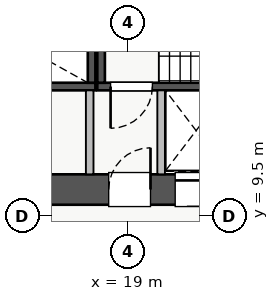
"""IFC4 building model, lengths in metres.
Left out: names, types, materials, properties, quantities, classifications, styles, units other than length and angle.
Written with IfcOpenShell. Run it as: python <this file> out.ifc"""

import sys

from ifc_helpers import new_model, si_unit, direction, frame, frame_2d, origin, place, context, subcontext, project, spatial, rectangle, extrude, source, transform, mapped, element, fill, save


model = new_model("IFC4")
c1 = context("Model", 3, precision=1e-05, world=origin(), true_north=direction((0.0, 1.0)))
c2 = subcontext(c1, "Body", "Model", "MODEL_VIEW")
j1 = project(units=[si_unit("LENGTHUNIT", "METRE"), si_unit("PLANEANGLEUNIT", "RADIAN")], contexts=[c1])
p1 = place(None, origin())
s1 = spatial("IfcSite", under=j1, at=p1, CompositionType="ELEMENT")
p2 = place(p1, origin())
s2 = spatial("IfcBuilding", under=s1, at=p2, CompositionType="ELEMENT")
p3 = place(p2, frame((0.0, 0.0, 36.0)))
s3 = spatial("IfcBuildingStorey", under=s2, at=p3, CompositionType="ELEMENT", Elevation=36.0)
p4 = place(p3, frame((19.88, 12.8, 0.0), z_axis=(0.0, 0.0, 1.0), x_axis=(1.0, 0.0, 0.0)))
e1 = element("IfcWall", 1, at=p4, inside=s3, PredefinedType="SHEAR", context=c2, shape_type="SweptSolid", body=[
    extrude(rectangle(XDim=1.87, YDim=0.18, at=frame_2d((0.935, 0.0))), origin(), (0.0, 0.0, 1.0), 3.07),
])
p5 = place(p3, frame((11.0, 12.91, 0.0), z_axis=(0.0, 0.0, 1.0), x_axis=(1.0, 0.0, 0.0)))
e2 = element("IfcWall", 2, at=p5, inside=s3, PredefinedType="SHEAR", context=c2, shape_type="SweptSolid", body=[
    extrude(rectangle(XDim=7.15, YDim=0.2, at=frame_2d((3.575, 0.0))), origin(), (0.0, 0.0, 1.0), 3.25),
])
p6 = place(p5, frame((0.35, 0.0, 0.0)))
e3 = element("IfcOpeningElement", 3, at=p6, cuts=e2, PredefinedType="OPENING", context=c2, shape_type="SweptSolid", body=[
    extrude(rectangle(XDim=1.1, YDim=2.05, at=frame_2d((0.55, 1.025))), frame((0.0, 0.11, 0.0), z_axis=(0.0, -1.0, 0.0), x_axis=(1.0, 0.0, 0.0)), (0.0, 0.0, 1.0), 0.22),
])
p7 = place(p3, frame((18.05, 13.01, 0.0), z_axis=(0.0, 0.0, 1.0), x_axis=(0.0, 1.0, 0.0)))
e4 = element("IfcWall", 4, at=p7, inside=s3, PredefinedType="SHEAR", context=c2, shape_type="SweptSolid", body=[
    extrude(rectangle(XDim=2.94, YDim=0.2, at=frame_2d((1.47, 0.0))), origin(), (0.0, 0.0, 1.0), 3.25),
])
p8 = place(p3, frame((18.2, 12.91, 0.0), z_axis=(0.0, 0.0, 1.0), x_axis=(1.0, 0.0, 0.0)))
e5 = element("IfcWall", 5, at=p8, inside=s3, PredefinedType="SHEAR", context=c2, shape_type="SweptSolid", body=[
    extrude(rectangle(XDim=7.15, YDim=0.2, at=frame_2d((3.575, 0.0))), origin(), (0.0, 0.0, 1.0), 3.25),
])
p9 = place(p8, frame((0.35, 0.0, 0.0)))
e6 = element("IfcOpeningElement", 6, at=p9, cuts=e5, PredefinedType="OPENING", context=c2, shape_type="SweptSolid", body=[
    extrude(rectangle(XDim=1.1, YDim=2.05, at=frame_2d((0.55, 1.025))), frame((0.0, 0.11, 0.0), z_axis=(0.0, -1.0, 0.0), x_axis=(1.0, 0.0, 0.0)), (0.0, 0.0, 1.0), 0.22),
])
p10 = place(p3, frame((18.3, 13.01, 0.0), z_axis=(0.0, 0.0, 1.0), x_axis=(0.0, 1.0, 0.0)))
e7 = element("IfcWall", 7, at=p10, inside=s3, PredefinedType="SHEAR", context=c2, shape_type="SweptSolid", body=[
    extrude(rectangle(XDim=2.94, YDim=0.2, at=frame_2d((1.47, 0.0))), origin(), (0.0, 0.0, 1.0), 3.25),
])
p11 = place(p3, frame((10.2, 10.2, 0.0), z_axis=(0.0, 0.0, 1.0), x_axis=(1.0, 0.0, 0.0)))
e8 = element("IfcWall", 8, at=p11, inside=s3, PredefinedType="SHEAR", context=c2, shape_type="SweptSolid", body=[
    extrude(rectangle(XDim=17.6, YDim=0.8, at=frame_2d((8.8, 0.0))), origin(), (0.0, 0.0, 1.0), 3.25),
])
p12 = place(p11, frame((1.15, 0.0, 0.0)))
e9 = element("IfcOpeningElement", 9, at=p12, cuts=e8, PredefinedType="OPENING", context=c2, shape_type="SweptSolid", body=[
    extrude(rectangle(XDim=1.1, YDim=2.05, at=frame_2d((0.55, 1.025))), frame((0.0, 0.41, 0.0), z_axis=(0.0, -1.0, 0.0), x_axis=(1.0, 0.0, 0.0)), (0.0, 0.0, 1.0), 0.82),
])
p13 = place(p11, frame((8.3, 0.0, 0.0)))
e10 = element("IfcOpeningElement", 10, at=p13, cuts=e8, PredefinedType="OPENING", context=c2, shape_type="SweptSolid", body=[
    extrude(rectangle(XDim=1.1, YDim=2.05, at=frame_2d((0.55, 1.025))), frame((0.0, 0.41, 0.0), z_axis=(0.0, -1.0, 0.0), x_axis=(1.0, 0.0, 0.0)), (0.0, 0.0, 1.0), 0.82),
])
p14 = place(p11, frame((10.05, 0.0, 0.0)))
e11 = element("IfcOpeningElement", 11, at=p14, cuts=e8, PredefinedType="OPENING", context=c2, shape_type="SweptSolid", body=[
    extrude(rectangle(XDim=1.1, YDim=2.05, at=frame_2d((0.55, 1.025))), frame((0.0, 0.41, 0.0), z_axis=(0.0, -1.0, 0.0), x_axis=(1.0, 0.0, 0.0)), (0.0, 0.0, 1.0), 0.82),
])
p15 = place(p11, frame((14.74, 0.0, 0.0)))
e12 = element("IfcOpeningElement", 12, at=p15, cuts=e8, PredefinedType="OPENING", context=c2, shape_type="SweptSolid", body=[
    extrude(rectangle(XDim=1.0, YDim=2.05, at=frame_2d((0.5, 1.025))), frame((0.0, 0.41, 0.0), z_axis=(0.0, -1.0, 0.0), x_axis=(1.0, 0.0, 0.0)), (0.0, 0.0, 1.0), 0.82),
])
p16 = place(p11, frame((11.945, 0.0, 0.0)))
e13 = element("IfcOpeningElement", 13, at=p16, cuts=e8, PredefinedType="OPENING", context=c2, shape_type="SweptSolid", body=[
    extrude(rectangle(XDim=1.0, YDim=2.05, at=frame_2d((0.5, 1.025))), frame((0.0, 0.41, 0.0), z_axis=(0.0, -1.0, 0.0), x_axis=(1.0, 0.0, 0.0)), (0.0, 0.0, 1.0), 0.82),
])
p17 = place(p11, frame((13.48, 0.0, 0.0)))
e14 = element("IfcOpeningElement", 14, at=p17, cuts=e8, PredefinedType="OPENING", context=c2, shape_type="SweptSolid", body=[
    extrude(rectangle(XDim=1.0, YDim=2.05, at=frame_2d((0.5, 1.025))), frame((0.0, 0.41, 0.0), z_axis=(0.0, -1.0, 0.0), x_axis=(1.0, 0.0, 0.0)), (0.0, 0.0, 1.0), 0.82),
])
for number, where, z_axis, x_axis in (
    (15, (18.0, 10.6, 0.0), (0.0, 0.0, 1.0), (0.0, 1.0, 0.0)),
    (16, (19.88, 10.6, 0.0), (0.0, 0.0, 1.0), (0.0, 1.0, 0.0)),
):
    element("IfcWall", number, at=place(p3, frame(where, z_axis=z_axis, x_axis=x_axis)), inside=s3, PredefinedType="PARTITIONING", context=c2, shape_type="SweptSolid", body=[
        extrude(rectangle(XDim=2.21, YDim=0.2, at=frame_2d((1.105, 0.0))), origin(), (0.0, 0.0, 1.0), 3.07),
    ])
m1 = source(origin(), c2, "Body", "SweptSolid", [
    extrude(rectangle(XDim=1.1, YDim=2.05, at=frame_2d((0.55, 1.025))), frame((0.0, 0.025, 0.0), z_axis=(0.0, -1.0, 0.0), x_axis=(1.0, 0.0, 0.0)), (0.0, 0.0, 1.0), 0.05),
])
p18 = place(p13, origin())
e17 = element("IfcDoor", 17, at=p18, inside=s3, OperationType="SINGLE_SWING_RIGHT", PredefinedType="DOOR", context=c2, shape_type="MappedRepresentation", body=[
    mapped(m1, transform((0.0, 0.0, 0.0), x_axis=(1.0, 0.0, 0.0), y_axis=(0.0, 1.0, 0.0), z_axis=(0.0, 0.0, 1.0), scale=1.0)),
])
fill(e10, e17)
p19 = place(p9, frame((1.1, 0.0, 0.0), z_axis=(0.0, 0.0, 1.0), x_axis=(-1.0, 0.0, 0.0)))
e18 = element("IfcDoor", 18, at=p19, inside=s3, OperationType="SINGLE_SWING_LEFT", PredefinedType="DOOR", context=c2, shape_type="MappedRepresentation", body=[
    mapped(m1, transform((0.0, 0.0, 0.0), x_axis=(1.0, 0.0, 0.0), y_axis=(0.0, 1.0, 0.0), z_axis=(0.0, 0.0, 1.0), scale=1.0)),
])
fill(e6, e18)
p20 = place(p14, origin())
e19 = element("IfcDoor", 19, at=p20, inside=s3, OperationType="SLIDING_TO_RIGHT", PredefinedType="DOOR", context=c2, shape_type="MappedRepresentation", body=[
    mapped(m1, transform((0.0, 0.0, 0.0), x_axis=(1.0, 0.0, 0.0), y_axis=(0.0, 1.0, 0.0), z_axis=(0.0, 0.0, 1.0), scale=1.0)),
])
fill(e11, e19)
save(model, sys.argv[1])
